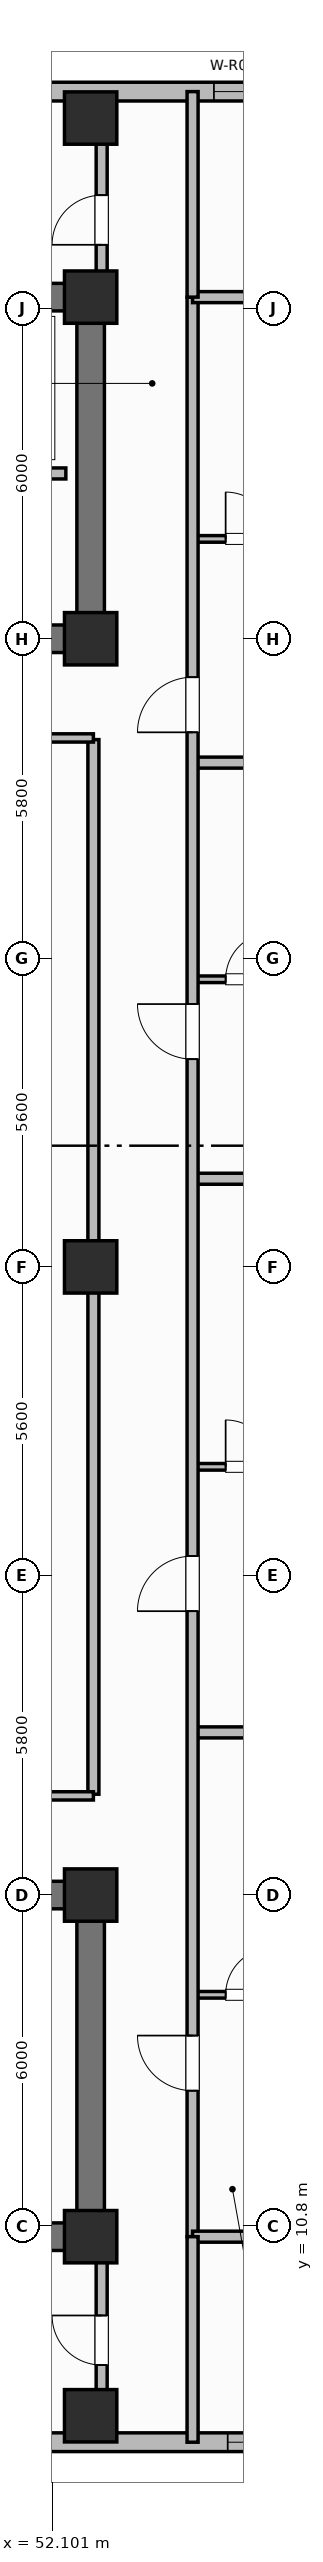
"""IFC4 building model, lengths in metres.
Left out: names, types, materials, properties, quantities, classifications, styles, units other than length and angle.
Written with IfcOpenShell. Run it as: python <this file> out.ifc"""

import sys

from ifc_helpers import new_model, si_unit, direction, frame, frame_2d, origin, origin_2d, place, context, subcontext, project, spatial, rectangle, extrude, element, fill, save


model = new_model("IFC4")
c1 = context("Model", 3, precision=1e-05, world=origin(), true_north=direction((0.0, 1.0)))
c2 = subcontext(c1, "Body", "Model", "MODEL_VIEW")
j1 = project(units=[si_unit("LENGTHUNIT", "METRE"), si_unit("PLANEANGLEUNIT", "RADIAN")], contexts=[c1])
p1 = place(None, origin())
s1 = spatial("IfcSite", under=j1, at=p1, CompositionType="ELEMENT")
p2 = place(p1, origin())
s2 = spatial("IfcBuilding", under=s1, at=p2, CompositionType="ELEMENT")
p3 = place(p2, frame((0.0, 0.0, 184.8)))
s3 = spatial("IfcBuildingStorey", under=s2, at=p3, CompositionType="ELEMENT", Elevation=184.8)
p4 = place(p3, frame((52.8, 10.6, 0.0), z_axis=(0.0, 0.0, 1.0), x_axis=(-1.0, 0.0, 0.0)))
e1 = element("IfcWall", 1, at=p4, inside=s3, PredefinedType="SHEAR", context=c2, shape_type="SweptSolid", body=[
    extrude(rectangle(XDim=27.2, YDim=0.5, at=frame_2d((13.6, 0.0))), origin(), (0.0, 0.0, 1.0), 3.7),
])
p5 = place(p3, frame((52.8, 10.85, 0.0), z_axis=(0.0, 0.0, 1.0), x_axis=(0.0, 1.0, 0.0)))
e2 = element("IfcWall", 2, at=p5, inside=s3, PredefinedType="SHEAR", context=c2, shape_type="SweptSolid", body=[
    extrude(rectangle(XDim=5.7, YDim=0.5, at=frame_2d((2.85, 0.0))), origin(), (0.0, 0.0, 1.0), 3.7),
])
p6 = place(p3, frame((25.6, 16.8, 0.0), z_axis=(0.0, 0.0, 1.0), x_axis=(1.0, 0.0, 0.0)))
e3 = element("IfcWall", 3, at=p6, inside=s3, PredefinedType="SHEAR", context=c2, shape_type="SweptSolid", body=[
    extrude(rectangle(XDim=27.2, YDim=0.5, at=frame_2d((13.6, 0.0))), origin(), (0.0, 0.0, 1.0), 3.7),
])
p7 = place(p6, frame((1.9, 0.0, 0.0)))
e4 = element("IfcOpeningElement", 4, at=p7, cuts=e3, PredefinedType="OPENING", context=c2, shape_type="SweptSolid", body=[
    extrude(rectangle(XDim=1.1, YDim=2.15, at=frame_2d((0.55, 1.075))), frame((0.0, 0.26, 0.0), z_axis=(0.0, -1.0, 0.0), x_axis=(1.0, 0.0, 0.0)), (0.0, 0.0, 1.0), 0.52),
])
p8 = place(p6, frame((13.0, 0.0, 0.0)))
e5 = element("IfcOpeningElement", 5, at=p8, cuts=e3, PredefinedType="OPENING", context=c2, shape_type="SweptSolid", body=[
    extrude(rectangle(XDim=1.2, YDim=2.15, at=frame_2d((0.6, 1.075))), frame((0.0, 0.26, 0.0), z_axis=(0.0, -1.0, 0.0), x_axis=(1.0, 0.0, 0.0)), (0.0, 0.0, 1.0), 0.52),
])
p9 = place(p6, frame((21.6, 0.0, 0.0)))
e6 = element("IfcOpeningElement", 6, at=p9, cuts=e3, PredefinedType="OPENING", context=c2, shape_type="SweptSolid", body=[
    extrude(rectangle(XDim=1.0, YDim=2.15, at=frame_2d((0.5, 1.075))), frame((0.0, 0.26, 0.0), z_axis=(0.0, -1.0, 0.0), x_axis=(1.0, 0.0, 0.0)), (0.0, 0.0, 1.0), 0.52),
])
p10 = place(p3, frame((25.6, 45.8, 0.0), z_axis=(0.0, 0.0, 1.0), x_axis=(1.0, 0.0, 0.0)))
e7 = element("IfcWall", 7, at=p10, inside=s3, PredefinedType="SHEAR", context=c2, shape_type="SweptSolid", body=[
    extrude(rectangle(XDim=27.2, YDim=0.5, at=frame_2d((13.6, 0.0))), origin(), (0.0, 0.0, 1.0), 3.7),
])
p11 = place(p3, frame((52.8, 39.85, 0.0), z_axis=(0.0, 0.0, 1.0), x_axis=(0.0, 1.0, 0.0)))
e8 = element("IfcWall", 8, at=p11, inside=s3, PredefinedType="SHEAR", context=c2, shape_type="SweptSolid", body=[
    extrude(rectangle(XDim=5.7, YDim=0.5, at=frame_2d((2.85, 0.0))), origin(), (0.0, 0.0, 1.0), 3.7),
])
p12 = place(p3, frame((52.8, 39.6, 0.0), z_axis=(0.0, 0.0, 1.0), x_axis=(-1.0, 0.0, 0.0)))
e9 = element("IfcWall", 9, at=p12, inside=s3, PredefinedType="SHEAR", context=c2, shape_type="SweptSolid", body=[
    extrude(rectangle(XDim=27.2, YDim=0.5, at=frame_2d((13.6, 0.0))), origin(), (0.0, 0.0, 1.0), 3.7),
])
p13 = place(p12, frame((24.2, 0.0, 0.0)))
e10 = element("IfcOpeningElement", 10, at=p13, cuts=e9, PredefinedType="OPENING", context=c2, shape_type="SweptSolid", body=[
    extrude(rectangle(XDim=1.1, YDim=2.15, at=frame_2d((0.55, 1.075))), frame((0.0, 0.26, 0.0), z_axis=(0.0, -1.0, 0.0), x_axis=(1.0, 0.0, 0.0)), (0.0, 0.0, 1.0), 0.52),
])
p14 = place(p12, frame((15.1, 0.0, 0.0)))
e11 = element("IfcOpeningElement", 11, at=p14, cuts=e9, PredefinedType="OPENING", context=c2, shape_type="SweptSolid", body=[
    extrude(rectangle(XDim=1.2, YDim=2.15, at=frame_2d((0.6, 1.075))), frame((0.0, 0.26, 0.0), z_axis=(0.0, -1.0, 0.0), x_axis=(1.0, 0.0, 0.0)), (0.0, 0.0, 1.0), 0.52),
])
p15 = place(p12, frame((11.6, 0.0, 0.0)))
e12 = element("IfcOpeningElement", 12, at=p15, cuts=e9, PredefinedType="OPENING", context=c2, shape_type="SweptSolid", body=[
    extrude(rectangle(XDim=0.9, YDim=2.1, at=frame_2d((0.45, 1.05))), frame((0.0, 0.26, 0.0), z_axis=(0.0, -1.0, 0.0), x_axis=(1.0, 0.0, 0.0)), (0.0, 0.0, 1.0), 0.52),
])
p16 = place(p12, frame((7.35, 0.0, 0.0)))
e13 = element("IfcOpeningElement", 13, at=p16, cuts=e9, PredefinedType="OPENING", context=c2, shape_type="SweptSolid", body=[
    extrude(rectangle(XDim=0.85, YDim=2.1, at=frame_2d((0.425, 1.05))), frame((0.0, 0.26, 0.0), z_axis=(0.0, -1.0, 0.0), x_axis=(1.0, 0.0, 0.0)), (0.0, 0.0, 1.0), 0.52),
])
p17 = place(p12, frame((3.6, 0.0, 0.0)))
e14 = element("IfcOpeningElement", 14, at=p17, cuts=e9, PredefinedType="OPENING", context=c2, shape_type="SweptSolid", body=[
    extrude(rectangle(XDim=1.0, YDim=2.15, at=frame_2d((0.5, 1.075))), frame((0.0, 0.26, 0.0), z_axis=(0.0, -1.0, 0.0), x_axis=(1.0, 0.0, 0.0)), (0.0, 0.0, 1.0), 0.52),
])
for number, where, z_axis, x_axis in (
    (15, (52.8, 10.6, 0.0), (0.0, 0.0, 1.0), (1.0, 0.0, 0.0)),
    (16, (52.8, 16.8, 0.0), (0.0, 0.0, 1.0), (1.0, 0.0, 0.0)),
    (17, (52.8, 39.6, 0.0), (0.0, 0.0, 1.0), (1.0, 0.0, 0.0)),
    (18, (52.8, 45.8, 0.0), (0.0, 0.0, 1.0), (1.0, 0.0, 0.0)),
    (19, (52.8, 28.2, 0.0), (0.0, 0.0, 1.0), (1.0, 0.0, 0.0)),
    (20, (52.8, 7.35, 0.0), (0.0, 0.0, 1.0), (1.0, 0.0, 0.0)),
    (21, (52.8, 49.05, 0.0), (0.0, 0.0, 1.0), (1.0, 0.0, 0.0)),
):
    element("IfcColumn", number, at=place(p3, frame(where, z_axis=z_axis, x_axis=x_axis)), inside=s3, PredefinedType="COLUMN", context=c2, shape_type="SweptSolid", body=[
        extrude(rectangle(XDim=0.95, YDim=0.95, at=origin_2d()), origin(), (0.0, 0.0, 1.0), 3.7),
    ])
p18 = place(p3, frame((42.4, 6.87, 0.0), z_axis=(0.0, 0.0, 1.0), x_axis=(1.0, 0.0, 0.0)))
e22 = element("IfcWall", 22, at=p18, inside=s3, PredefinedType="SOLIDWALL", context=c2, shape_type="SweptSolid", body=[
    extrude(rectangle(XDim=15.8, YDim=0.34, at=frame_2d((7.9, 0.0))), origin(), (0.0, 0.0, 1.0), 2.72),
])
p19 = place(p18, frame((2.363, 0.0, 0.7)))
e23 = element("IfcOpeningElement", 23, at=p19, cuts=e22, PredefinedType="OPENING", context=c2, shape_type="SweptSolid", body=[
    extrude(rectangle(XDim=1.6, YDim=1.9, at=frame_2d((0.8, 0.95))), frame((0.0, 0.18, 0.0), z_axis=(0.0, -1.0, 0.0), x_axis=(1.0, 0.0, 0.0)), (0.0, 0.0, 1.0), 0.36),
])
p20 = place(p18, frame((5.288, 0.0, 0.7)))
e24 = element("IfcOpeningElement", 24, at=p20, cuts=e22, PredefinedType="OPENING", context=c2, shape_type="SweptSolid", body=[
    extrude(rectangle(XDim=1.6, YDim=1.9, at=frame_2d((0.8, 0.95))), frame((0.0, 0.18, 0.0), z_axis=(0.0, -1.0, 0.0), x_axis=(1.0, 0.0, 0.0)), (0.0, 0.0, 1.0), 0.36),
])
p21 = place(p18, frame((12.887, 0.0, 0.7)))
e25 = element("IfcOpeningElement", 25, at=p21, cuts=e22, PredefinedType="OPENING", context=c2, shape_type="SweptSolid", body=[
    extrude(rectangle(XDim=1.6, YDim=1.9, at=frame_2d((0.8, 0.95))), frame((0.0, 0.18, 0.0), z_axis=(0.0, -1.0, 0.0), x_axis=(1.0, 0.0, 0.0)), (0.0, 0.0, 1.0), 0.36),
])
p22 = place(p3, frame((58.2, 49.53, 0.0), z_axis=(0.0, 0.0, 1.0), x_axis=(-1.0, 0.0, 0.0)))
e26 = element("IfcWall", 26, at=p22, inside=s3, PredefinedType="SOLIDWALL", context=c2, shape_type="SweptSolid", body=[
    extrude(rectangle(XDim=15.8, YDim=0.34, at=frame_2d((7.9, 0.0))), origin(), (0.0, 0.0, 1.0), 2.72),
])
p23 = place(p22, frame((1.062, 0.0, 0.7)))
e27 = element("IfcOpeningElement", 27, at=p23, cuts=e26, PredefinedType="OPENING", context=c2, shape_type="SweptSolid", body=[
    extrude(rectangle(XDim=2.1, YDim=1.9, at=frame_2d((1.05, 0.95))), frame((0.0, 0.18, 0.0), z_axis=(0.0, -1.0, 0.0), x_axis=(1.0, 0.0, 0.0)), (0.0, 0.0, 1.0), 0.36),
])
p24 = place(p22, frame((7.962, 0.0, 0.7)))
e28 = element("IfcOpeningElement", 28, at=p24, cuts=e26, PredefinedType="OPENING", context=c2, shape_type="SweptSolid", body=[
    extrude(rectangle(XDim=2.1, YDim=1.9, at=frame_2d((1.05, 0.95))), frame((0.0, 0.18, 0.0), z_axis=(0.0, -1.0, 0.0), x_axis=(1.0, 0.0, 0.0)), (0.0, 0.0, 1.0), 0.36),
])
p25 = place(p22, frame((11.587, 0.0, 0.7)))
e29 = element("IfcOpeningElement", 29, at=p25, cuts=e26, PredefinedType="OPENING", context=c2, shape_type="SweptSolid", body=[
    extrude(rectangle(XDim=2.1, YDim=1.9, at=frame_2d((1.05, 0.95))), frame((0.0, 0.18, 0.0), z_axis=(0.0, -1.0, 0.0), x_axis=(1.0, 0.0, 0.0)), (0.0, 0.0, 1.0), 0.36),
])
p26 = place(p3, frame((52.35, 42.6, 0.0), z_axis=(0.0, 0.0, 1.0), x_axis=(-1.0, 0.0, 0.0)))
e30 = element("IfcWall", 30, at=p26, inside=s3, PredefinedType="PARTITIONING", context=c2, shape_type="SweptSolid", body=[
    extrude(rectangle(XDim=6.5, YDim=0.2, at=frame_2d((3.25, 0.0))), origin(), (0.0, 0.0, 1.0), 2.55),
])
p27 = place(p3, frame((52.85, 18.63, 0.0), z_axis=(0.0, 0.0, 1.0), x_axis=(0.0, 1.0, 0.0)))
e31 = element("IfcWall", 31, at=p27, inside=s3, PredefinedType="PARTITIONING", context=c2, shape_type="SweptSolid", body=[
    extrude(rectangle(XDim=19.14, YDim=0.2, at=frame_2d((9.57, 0.0))), origin(), (0.0, 0.0, 1.0), 2.55),
])
for number, where, z_axis, x_axis in (
    (32, (31.35, 18.6, 0.0), (0.0, 0.0, 1.0), (1.0, 0.0, 0.0)),
    (33, (31.35, 37.8, 0.0), (0.0, 0.0, 1.0), (1.0, 0.0, 0.0)),
):
    element("IfcWall", number, at=place(p3, frame(where, z_axis=z_axis, x_axis=x_axis)), inside=s3, PredefinedType="PARTITIONING", context=c2, shape_type="SweptSolid", body=[
        extrude(rectangle(XDim=21.5, YDim=0.15, at=frame_2d((10.75, 0.0))), origin(), (0.0, 0.0, 1.0), 2.55),
    ])
p28 = place(p3, frame((54.65, 14.99, 0.0), z_axis=(0.0, 0.0, 1.0), x_axis=(1.0, 0.0, 0.0)))
e34 = element("IfcWall", 34, at=p28, inside=s3, PredefinedType="PARTITIONING", context=c2, shape_type="SweptSolid", body=[
    extrude(rectangle(XDim=2.25, YDim=0.12, at=frame_2d((1.125, 0.0))), origin(), (0.0, 0.0, 1.0), 2.55),
])
p29 = place(p28, frame((0.6, 0.0, 0.0)))
e35 = element("IfcOpeningElement", 35, at=p29, cuts=e34, PredefinedType="OPENING", context=c2, shape_type="SweptSolid", body=[
    extrude(rectangle(XDim=0.85, YDim=2.1, at=frame_2d((0.425, 1.05))), frame((0.0, 0.07, 0.0), z_axis=(0.0, -1.0, 0.0), x_axis=(1.0, 0.0, 0.0)), (0.0, 0.0, 1.0), 0.14),
])
p30 = place(p3, frame((54.65, 19.752, 0.0), z_axis=(0.0, 0.0, 1.0), x_axis=(1.0, 0.0, 0.0)))
e36 = element("IfcWall", 36, at=p30, inside=s3, PredefinedType="PARTITIONING", context=c2, shape_type="SweptSolid", body=[
    extrude(rectangle(XDim=7.18, YDim=0.2, at=frame_2d((3.59, 0.0))), origin(), (0.0, 0.0, 1.0), 2.55),
])
p31 = place(p3, frame((54.65, 24.572, 0.0), z_axis=(0.0, 0.0, 1.0), x_axis=(1.0, 0.0, 0.0)))
e37 = element("IfcWall", 37, at=p31, inside=s3, PredefinedType="PARTITIONING", context=c2, shape_type="SweptSolid", body=[
    extrude(rectangle(XDim=2.25, YDim=0.12, at=frame_2d((1.125, 0.0))), origin(), (0.0, 0.0, 1.0), 2.55),
])
p32 = place(p31, frame((0.6, 0.0, 0.0)))
e38 = element("IfcOpeningElement", 38, at=p32, cuts=e37, PredefinedType="OPENING", context=c2, shape_type="SweptSolid", body=[
    extrude(rectangle(XDim=0.85, YDim=2.1, at=frame_2d((0.425, 1.05))), frame((0.0, 0.07, 0.0), z_axis=(0.0, -1.0, 0.0), x_axis=(1.0, 0.0, 0.0)), (0.0, 0.0, 1.0), 0.14),
])
p33 = place(p3, frame((54.65, 29.8, 0.0), z_axis=(0.0, 0.0, 1.0), x_axis=(1.0, 0.0, 0.0)))
e39 = element("IfcWall", 39, at=p33, inside=s3, PredefinedType="PARTITIONING", context=c2, shape_type="SweptSolid", body=[
    extrude(rectangle(XDim=6.78, YDim=0.2, at=frame_2d((3.39, 0.0))), origin(), (0.0, 0.0, 1.0), 2.55),
])
p34 = place(p3, frame((54.65, 33.42, 0.0), z_axis=(0.0, 0.0, 1.0), x_axis=(1.0, 0.0, 0.0)))
e40 = element("IfcWall", 40, at=p34, inside=s3, PredefinedType="PARTITIONING", context=c2, shape_type="SweptSolid", body=[
    extrude(rectangle(XDim=2.25, YDim=0.12, at=frame_2d((1.125, 0.0))), origin(), (0.0, 0.0, 1.0), 2.55),
])
p35 = place(p34, frame((0.6, 0.0, 0.0)))
e41 = element("IfcOpeningElement", 41, at=p35, cuts=e40, PredefinedType="OPENING", context=c2, shape_type="SweptSolid", body=[
    extrude(rectangle(XDim=0.85, YDim=2.1, at=frame_2d((0.425, 1.05))), frame((0.0, 0.07, 0.0), z_axis=(0.0, -1.0, 0.0), x_axis=(1.0, 0.0, 0.0)), (0.0, 0.0, 1.0), 0.14),
])
p36 = place(p3, frame((54.65, 37.352, 0.0), z_axis=(0.0, 0.0, 1.0), x_axis=(1.0, 0.0, 0.0)))
e42 = element("IfcWall", 42, at=p36, inside=s3, PredefinedType="PARTITIONING", context=c2, shape_type="SweptSolid", body=[
    extrude(rectangle(XDim=7.18, YDim=0.2, at=frame_2d((3.59, 0.0))), origin(), (0.0, 0.0, 1.0), 2.55),
])
p37 = place(p3, frame((54.65, 41.412, 0.0), z_axis=(0.0, 0.0, 1.0), x_axis=(1.0, 0.0, 0.0)))
e43 = element("IfcWall", 43, at=p37, inside=s3, PredefinedType="PARTITIONING", context=c2, shape_type="SweptSolid", body=[
    extrude(rectangle(XDim=2.25, YDim=0.12, at=frame_2d((1.125, 0.0))), origin(), (0.0, 0.0, 1.0), 2.55),
])
p38 = place(p37, frame((0.6, 0.0, 0.0)))
e44 = element("IfcOpeningElement", 44, at=p38, cuts=e43, PredefinedType="OPENING", context=c2, shape_type="SweptSolid", body=[
    extrude(rectangle(XDim=0.85, YDim=2.1, at=frame_2d((0.425, 1.05))), frame((0.0, 0.07, 0.0), z_axis=(0.0, -1.0, 0.0), x_axis=(1.0, 0.0, 0.0)), (0.0, 0.0, 1.0), 0.14),
])
p39 = place(p3, frame((54.65, 10.6, 0.0), z_axis=(0.0, 0.0, 1.0), x_axis=(0.0, 1.0, 0.0)))
e45 = element("IfcWall", 45, at=p39, inside=s3, PredefinedType="PARTITIONING", context=c2, shape_type="SweptSolid", body=[
    extrude(rectangle(XDim=35.2, YDim=0.2, at=frame_2d((17.6, 0.0))), origin(), (0.0, 0.0, 1.0), 2.55),
])
p40 = place(p39, frame((2.65, 0.0, 0.0)))
e46 = element("IfcOpeningElement", 46, at=p40, cuts=e45, PredefinedType="OPENING", context=c2, shape_type="SweptSolid", body=[
    extrude(rectangle(XDim=1.0, YDim=2.15, at=frame_2d((0.5, 1.075))), frame((0.0, 0.11, 0.0), z_axis=(0.0, -1.0, 0.0), x_axis=(1.0, 0.0, 0.0)), (0.0, 0.0, 1.0), 0.22),
])
p41 = place(p39, frame((11.352, 0.0, 0.0)))
e47 = element("IfcOpeningElement", 47, at=p41, cuts=e45, PredefinedType="OPENING", context=c2, shape_type="SweptSolid", body=[
    extrude(rectangle(XDim=1.0, YDim=2.15, at=frame_2d((0.5, 1.075))), frame((0.0, 0.11, 0.0), z_axis=(0.0, -1.0, 0.0), x_axis=(1.0, 0.0, 0.0)), (0.0, 0.0, 1.0), 0.22),
])
p42 = place(p39, frame((21.37, 0.0, 0.0)))
e48 = element("IfcOpeningElement", 48, at=p42, cuts=e45, PredefinedType="OPENING", context=c2, shape_type="SweptSolid", body=[
    extrude(rectangle(XDim=1.0, YDim=2.15, at=frame_2d((0.5, 1.075))), frame((0.0, 0.11, 0.0), z_axis=(0.0, -1.0, 0.0), x_axis=(1.0, 0.0, 0.0)), (0.0, 0.0, 1.0), 0.22),
])
p43 = place(p39, frame((27.302, 0.0, 0.0)))
e49 = element("IfcOpeningElement", 49, at=p43, cuts=e45, PredefinedType="OPENING", context=c2, shape_type="SweptSolid", body=[
    extrude(rectangle(XDim=1.0, YDim=2.15, at=frame_2d((0.5, 1.075))), frame((0.0, 0.11, 0.0), z_axis=(0.0, -1.0, 0.0), x_axis=(1.0, 0.0, 0.0)), (0.0, 0.0, 1.0), 0.22),
])
for number, where, z_axis, x_axis in (
    (50, (54.65, 10.6, 0.0), (0.0, 0.0, 1.0), (1.0, 0.0, 0.0)),
    (51, (54.65, 45.8, 0.0), (0.0, 0.0, 1.0), (1.0, 0.0, 0.0)),
):
    element("IfcWall", number, at=place(p3, frame(where, z_axis=z_axis, x_axis=x_axis)), inside=s3, PredefinedType="PARTITIONING", context=c2, shape_type="SweptSolid", body=[
        extrude(rectangle(XDim=6.76, YDim=0.2, at=frame_2d((3.38, 0.0))), origin(), (0.0, 0.0, 1.0), 2.55),
    ])
for number, where, z_axis, x_axis in (
    (52, (54.65, 6.87, 0.0), (0.0, 0.0, 1.0), (0.0, 1.0, 0.0)),
    (53, (54.65, 45.8, 0.0), (0.0, 0.0, 1.0), (0.0, 1.0, 0.0)),
):
    element("IfcWall", number, at=place(p3, frame(where, z_axis=z_axis, x_axis=x_axis)), inside=s3, PredefinedType="PARTITIONING", context=c2, shape_type="SweptSolid", body=[
        extrude(rectangle(XDim=3.73, YDim=0.2, at=frame_2d((1.865, 0.0))), origin(), (0.0, 0.0, 1.0), 2.55),
    ])
p44 = place(p3, frame((53.0, 7.62, 0.0), z_axis=(0.0, 0.0, 1.0), x_axis=(0.0, 1.0, 0.0)))
e54 = element("IfcWall", 54, at=p44, inside=s3, PredefinedType="PARTITIONING", context=c2, shape_type="SweptSolid", body=[
    extrude(rectangle(XDim=2.68, YDim=0.2, at=frame_2d((1.34, 0.0))), origin(), (0.0, 0.0, 1.0), 2.55),
])
p45 = place(p44, frame((0.65, 0.0, 0.0)))
e55 = element("IfcOpeningElement", 55, at=p45, cuts=e54, PredefinedType="OPENING", context=c2, shape_type="SweptSolid", body=[
    extrude(rectangle(XDim=0.9, YDim=2.1, at=frame_2d((0.45, 1.05))), frame((0.0, 0.11, 0.0), z_axis=(0.0, -1.0, 0.0), x_axis=(1.0, 0.0, 0.0)), (0.0, 0.0, 1.0), 0.22),
])
p46 = place(p3, frame((53.0, 46.1, 0.0), z_axis=(0.0, 0.0, 1.0), x_axis=(0.0, 1.0, 0.0)))
e56 = element("IfcWall", 56, at=p46, inside=s3, PredefinedType="PARTITIONING", context=c2, shape_type="SweptSolid", body=[
    extrude(rectangle(XDim=2.68, YDim=0.2, at=frame_2d((1.34, 0.0))), origin(), (0.0, 0.0, 1.0), 2.55),
])
p47 = place(p46, frame((0.65, 0.0, 0.0)))
e57 = element("IfcOpeningElement", 57, at=p47, cuts=e56, PredefinedType="OPENING", context=c2, shape_type="SweptSolid", body=[
    extrude(rectangle(XDim=0.9, YDim=2.1, at=frame_2d((0.45, 1.05))), frame((0.0, 0.11, 0.0), z_axis=(0.0, -1.0, 0.0), x_axis=(1.0, 0.0, 0.0)), (0.0, 0.0, 1.0), 0.22),
])
p48 = place(p21, origin())
e58 = element("IfcWindow", 58, at=p48, inside=s3, PartitioningType="SINGLE_PANEL", PredefinedType="WINDOW", context=c2, shape_type="SweptSolid", body=[
    extrude(rectangle(XDim=1.6, YDim=1.9, at=frame_2d((0.8, 0.95))), frame((0.0, 0.03, 0.0), z_axis=(0.0, -1.0, 0.0), x_axis=(1.0, 0.0, 0.0)), (0.0, 0.0, 1.0), 0.06),
])
fill(e25, e58)
p49 = place(p23, origin())
e59 = element("IfcWindow", 59, at=p49, inside=s3, PartitioningType="SINGLE_PANEL", PredefinedType="WINDOW", context=c2, shape_type="SweptSolid", body=[
    extrude(rectangle(XDim=2.1, YDim=1.9, at=frame_2d((1.05, 0.95))), frame((0.0, 0.03, 0.0), z_axis=(0.0, -1.0, 0.0), x_axis=(1.0, 0.0, 0.0)), (0.0, 0.0, 1.0), 0.06),
])
fill(e27, e59)
p50 = place(p29, origin())
e60 = element("IfcDoor", 60, at=p50, inside=s3, OperationType="SINGLE_SWING_RIGHT", PredefinedType="DOOR", context=c2, shape_type="SweptSolid", body=[
    extrude(rectangle(XDim=0.85, YDim=2.1, at=frame_2d((0.425, 1.05))), frame((0.0, 0.025, 0.0), z_axis=(0.0, -1.0, 0.0), x_axis=(1.0, 0.0, 0.0)), (0.0, 0.0, 1.0), 0.05),
])
fill(e35, e60)
p51 = place(p32, origin())
e61 = element("IfcDoor", 61, at=p51, inside=s3, OperationType="SINGLE_SWING_LEFT", PredefinedType="DOOR", context=c2, shape_type="SweptSolid", body=[
    extrude(rectangle(XDim=0.85, YDim=2.1, at=frame_2d((0.425, 1.05))), frame((0.0, 0.025, 0.0), z_axis=(0.0, -1.0, 0.0), x_axis=(1.0, 0.0, 0.0)), (0.0, 0.0, 1.0), 0.05),
])
fill(e38, e61)
p52 = place(p35, origin())
e62 = element("IfcDoor", 62, at=p52, inside=s3, OperationType="SINGLE_SWING_RIGHT", PredefinedType="DOOR", context=c2, shape_type="SweptSolid", body=[
    extrude(rectangle(XDim=0.85, YDim=2.1, at=frame_2d((0.425, 1.05))), frame((0.0, 0.025, 0.0), z_axis=(0.0, -1.0, 0.0), x_axis=(1.0, 0.0, 0.0)), (0.0, 0.0, 1.0), 0.05),
])
fill(e41, e62)
p53 = place(p38, origin())
e63 = element("IfcDoor", 63, at=p53, inside=s3, OperationType="SINGLE_SWING_LEFT", PredefinedType="DOOR", context=c2, shape_type="SweptSolid", body=[
    extrude(rectangle(XDim=0.85, YDim=2.1, at=frame_2d((0.425, 1.05))), frame((0.0, 0.025, 0.0), z_axis=(0.0, -1.0, 0.0), x_axis=(1.0, 0.0, 0.0)), (0.0, 0.0, 1.0), 0.05),
])
fill(e44, e63)
p54 = place(p40, origin())
e64 = element("IfcDoor", 64, at=p54, inside=s3, OperationType="SINGLE_SWING_RIGHT", PredefinedType="DOOR", context=c2, shape_type="SweptSolid", body=[
    extrude(rectangle(XDim=1.0, YDim=2.15, at=frame_2d((0.5, 1.075))), frame((0.0, 0.025, 0.0), z_axis=(0.0, -1.0, 0.0), x_axis=(1.0, 0.0, 0.0)), (0.0, 0.0, 1.0), 0.05),
])
fill(e46, e64)
p55 = place(p41, origin())
e65 = element("IfcDoor", 65, at=p55, inside=s3, OperationType="SINGLE_SWING_LEFT", PredefinedType="DOOR", context=c2, shape_type="SweptSolid", body=[
    extrude(rectangle(XDim=1.0, YDim=2.15, at=frame_2d((0.5, 1.075))), frame((0.0, 0.025, 0.0), z_axis=(0.0, -1.0, 0.0), x_axis=(1.0, 0.0, 0.0)), (0.0, 0.0, 1.0), 0.05),
])
fill(e47, e65)
p56 = place(p42, origin())
e66 = element("IfcDoor", 66, at=p56, inside=s3, OperationType="SINGLE_SWING_RIGHT", PredefinedType="DOOR", context=c2, shape_type="SweptSolid", body=[
    extrude(rectangle(XDim=1.0, YDim=2.15, at=frame_2d((0.5, 1.075))), frame((0.0, 0.025, 0.0), z_axis=(0.0, -1.0, 0.0), x_axis=(1.0, 0.0, 0.0)), (0.0, 0.0, 1.0), 0.05),
])
fill(e48, e66)
p57 = place(p43, origin())
e67 = element("IfcDoor", 67, at=p57, inside=s3, OperationType="SINGLE_SWING_LEFT", PredefinedType="DOOR", context=c2, shape_type="SweptSolid", body=[
    extrude(rectangle(XDim=1.0, YDim=2.15, at=frame_2d((0.5, 1.075))), frame((0.0, 0.025, 0.0), z_axis=(0.0, -1.0, 0.0), x_axis=(1.0, 0.0, 0.0)), (0.0, 0.0, 1.0), 0.05),
])
fill(e49, e67)
p58 = place(p45, origin())
e68 = element("IfcDoor", 68, at=p58, inside=s3, OperationType="SINGLE_SWING_RIGHT", PredefinedType="DOOR", context=c2, shape_type="SweptSolid", body=[
    extrude(rectangle(XDim=0.9, YDim=2.1, at=frame_2d((0.45, 1.05))), frame((0.0, 0.025, 0.0), z_axis=(0.0, -1.0, 0.0), x_axis=(1.0, 0.0, 0.0)), (0.0, 0.0, 1.0), 0.05),
])
fill(e55, e68)
p59 = place(p47, origin())
e69 = element("IfcDoor", 69, at=p59, inside=s3, OperationType="SINGLE_SWING_LEFT", PredefinedType="DOOR", context=c2, shape_type="SweptSolid", body=[
    extrude(rectangle(XDim=0.9, YDim=2.1, at=frame_2d((0.45, 1.05))), frame((0.0, 0.025, 0.0), z_axis=(0.0, -1.0, 0.0), x_axis=(1.0, 0.0, 0.0)), (0.0, 0.0, 1.0), 0.05),
])
fill(e57, e69)
save(model, sys.argv[1])
